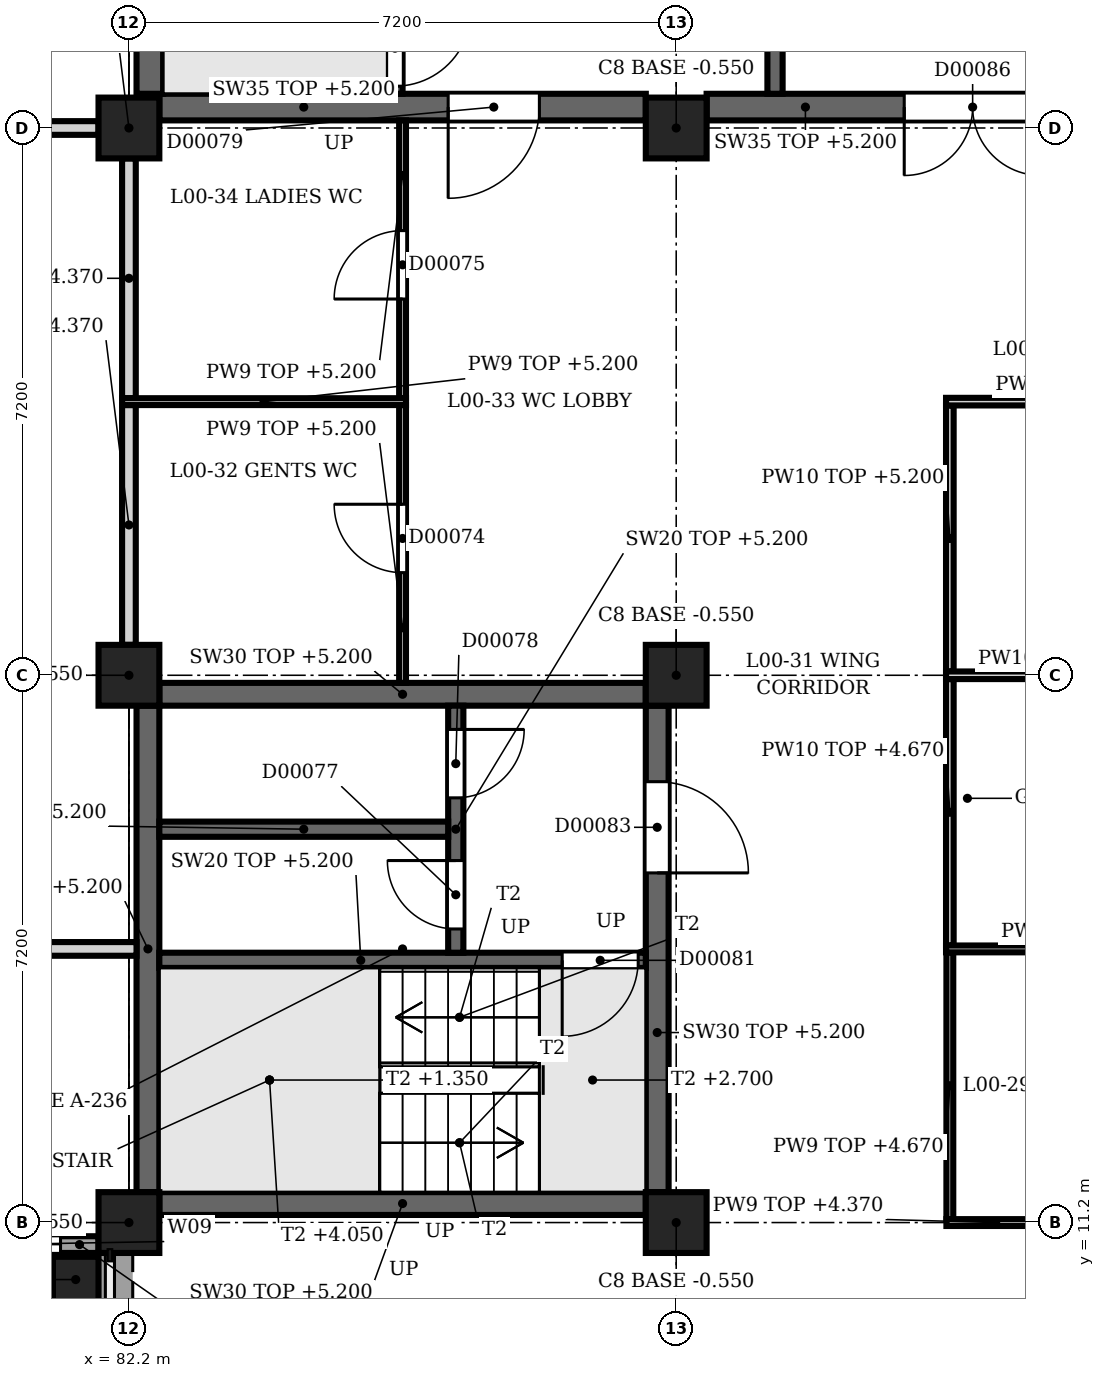
"""IFC4 building model, lengths in metres.
Left out: names, types, materials, properties, quantities, classifications, styles, units other than length and angle.
Written with IfcOpenShell. Run it as: python <this file> out.ifc"""

import sys

from ifc_helpers import new_model, si_unit, direction, frame, frame_2d, origin, origin_2d, place, context, subcontext, project, spatial, rectangle, extrude, element, fill, save


model = new_model("IFC4")
c1 = context("Model", 3, precision=1e-05, world=origin(), true_north=direction((0.0, 1.0)))
c2 = subcontext(c1, "Body", "Model", "MODEL_VIEW")
j1 = project(units=[si_unit("LENGTHUNIT", "METRE"), si_unit("PLANEANGLEUNIT", "RADIAN")], contexts=[c1])
p1 = place(None, origin())
s1 = spatial("IfcSite", under=j1, at=p1, CompositionType="ELEMENT")
p2 = place(p1, origin())
s2 = spatial("IfcBuilding", under=s1, at=p2, CompositionType="ELEMENT")
p3 = place(p2, origin())
s3 = spatial("IfcBuildingStorey", under=s2, at=p3, CompositionType="ELEMENT", Elevation=0.0)
for number, where, z_axis, x_axis in (
    (1, (82.2, 11.2, -0.55), (0.0, 0.0, 1.0), (1.0, 0.0, 0.0)),
    (2, (82.2, 18.4, -0.55), (0.0, 0.0, 1.0), (1.0, 0.0, 0.0)),
    (3, (82.2, 25.6, -0.55), (0.0, 0.0, 1.0), (1.0, 0.0, 0.0)),
    (4, (89.4, 11.2, -0.55), (0.0, 0.0, 1.0), (1.0, 0.0, 0.0)),
    (5, (89.4, 18.4, -0.55), (0.0, 0.0, 1.0), (1.0, 0.0, 0.0)),
    (6, (89.4, 25.6, -0.55), (0.0, 0.0, 1.0), (1.0, 0.0, 0.0)),
):
    element("IfcColumn", number, at=place(p3, frame(where, z_axis=z_axis, x_axis=x_axis)), inside=s3, PredefinedType="COLUMN", context=c2, shape_type="SweptSolid", body=[
        extrude(rectangle(XDim=0.8, YDim=0.8, at=origin_2d()), origin(), (0.0, 0.0, 1.0), 5.95),
    ])
p4 = place(p3, frame((81.5, 10.45, -0.55), z_axis=(0.0, 0.0, 1.0), x_axis=(1.0, 0.0, 0.0)))
e7 = element("IfcColumn", 7, at=p4, inside=s3, PredefinedType="COLUMN", context=c2, shape_type="SweptSolid", body=[
    extrude(rectangle(XDim=0.6, YDim=0.6, at=origin_2d()), origin(), (0.0, 0.0, 1.0), 5.95),
])
p5 = place(p3, frame((82.025, 8.0, 0.0), z_axis=(0.0, 0.0, 1.0), x_axis=(0.0, 1.0, 0.0)))
e8 = element("IfcWall", 8, at=p5, inside=s3, PredefinedType="SOLIDWALL", context=c2, shape_type="SweptSolid", body=[
    extrude(rectangle(XDim=2.8, YDim=0.45, at=frame_2d((1.4, 0.0))), origin(), (0.0, 0.0, 1.0), 0.9),
])
p6 = place(p3, frame((81.8, 10.91, 0.0), z_axis=(0.0, 0.0, 1.0), x_axis=(-1.0, 0.0, 0.0)))
e9 = element("IfcWall", 9, at=p6, inside=s3, PredefinedType="SOLIDWALL", context=c2, shape_type="SweptSolid", body=[
    extrude(rectangle(XDim=2.8, YDim=0.22, at=frame_2d((1.4, 0.0))), origin(), (0.0, 0.0, 1.0), 4.3),
])
p7 = place(p6, frame((0.5, 0.0, 0.9)))
e10 = element("IfcOpeningElement", 10, at=p7, cuts=e9, PredefinedType="OPENING", context=c2, shape_type="SweptSolid", body=[
    extrude(rectangle(XDim=1.8, YDim=2.1, at=frame_2d((0.9, 1.05))), frame((0.0, 0.12, 0.0), z_axis=(0.0, -1.0, 0.0), x_axis=(1.0, 0.0, 0.0)), (0.0, 0.0, 1.0), 0.24),
])
p8 = place(p3, frame((82.6, 25.875, 0.0), z_axis=(0.0, 0.0, 1.0), x_axis=(1.0, 0.0, 0.0)))
e11 = element("IfcWall", 11, at=p8, inside=s3, PredefinedType="SHEAR", context=c2, shape_type="SweptSolid", body=[
    extrude(rectangle(XDim=6.4, YDim=0.35, at=frame_2d((3.2, 0.0))), origin(), (0.0, 0.0, 1.0), 5.2),
])
p9 = place(p8, frame((3.8, 0.0, 0.0)))
e12 = element("IfcOpeningElement", 12, at=p9, cuts=e11, PredefinedType="OPENING", context=c2, shape_type="SweptSolid", body=[
    extrude(rectangle(XDim=1.2, YDim=2.1, at=frame_2d((0.6, 1.05))), frame((0.0, 0.185, 0.0), z_axis=(0.0, -1.0, 0.0), x_axis=(1.0, 0.0, 0.0)), (0.0, 0.0, 1.0), 0.37),
])
p10 = place(p3, frame((89.8, 25.875, 0.0), z_axis=(0.0, 0.0, 1.0), x_axis=(1.0, 0.0, 0.0)))
e13 = element("IfcWall", 13, at=p10, inside=s3, PredefinedType="SHEAR", context=c2, shape_type="SweptSolid", body=[
    extrude(rectangle(XDim=6.4, YDim=0.35, at=frame_2d((3.2, 0.0))), origin(), (0.0, 0.0, 1.0), 5.2),
])
p11 = place(p10, frame((2.6, 0.0, 0.0)))
e14 = element("IfcOpeningElement", 14, at=p11, cuts=e13, PredefinedType="OPENING", context=c2, shape_type="SweptSolid", body=[
    extrude(rectangle(XDim=1.8, YDim=2.1, at=frame_2d((0.9, 1.05))), frame((0.0, 0.185, 0.0), z_axis=(0.0, -1.0, 0.0), x_axis=(1.0, 0.0, 0.0)), (0.0, 0.0, 1.0), 0.37),
])
p12 = place(p3, frame((82.475, 26.05, 0.0), z_axis=(0.0, 0.0, 1.0), x_axis=(0.0, 1.0, 0.0)))
e15 = element("IfcWall", 15, at=p12, inside=s3, PredefinedType="SHEAR", context=c2, shape_type="SweptSolid", body=[
    extrude(rectangle(XDim=6.3, YDim=0.35, at=frame_2d((3.15, 0.0))), origin(), (0.0, 0.0, 1.0), 5.2),
])
p13 = place(p3, frame((85.7, 26.05, 0.0), z_axis=(0.0, 0.0, 1.0), x_axis=(0.0, 1.0, 0.0)))
e16 = element("IfcWall", 16, at=p13, inside=s3, PredefinedType="SHEAR", context=c2, shape_type="SweptSolid", body=[
    extrude(rectangle(XDim=6.3, YDim=0.2, at=frame_2d((3.15, 0.0))), origin(), (0.0, 0.0, 1.0), 5.2),
])
p14 = place(p13, frame((0.1, 0.0, 0.0)))
e17 = element("IfcOpeningElement", 17, at=p14, cuts=e16, PredefinedType="OPENING", context=c2, shape_type="SweptSolid", body=[
    extrude(rectangle(XDim=1.0, YDim=2.1, at=frame_2d((0.5, 1.05))), frame((0.0, 0.11, 0.0), z_axis=(0.0, -1.0, 0.0), x_axis=(1.0, 0.0, 0.0)), (0.0, 0.0, 1.0), 0.22),
])
p15 = place(p3, frame((90.7, 26.05, 0.0), z_axis=(0.0, 0.0, 1.0), x_axis=(0.0, 1.0, 0.0)))
e18 = element("IfcWall", 18, at=p15, inside=s3, PredefinedType="SHEAR", context=c2, shape_type="SweptSolid", body=[
    extrude(rectangle(XDim=3.05, YDim=0.2, at=frame_2d((1.525, 0.0))), origin(), (0.0, 0.0, 1.0), 5.2),
])
p16 = place(p3, frame((89.15, 11.6, 0.0), z_axis=(0.0, 0.0, 1.0), x_axis=(0.0, 1.0, 0.0)))
e19 = element("IfcWall", 19, at=p16, inside=s3, PredefinedType="SHEAR", context=c2, shape_type="SweptSolid", body=[
    extrude(rectangle(XDim=6.4, YDim=0.3, at=frame_2d((3.2, 0.0))), origin(), (0.0, 0.0, 1.0), 5.2),
])
p17 = place(p16, frame((4.2, 0.0, 0.0)))
e20 = element("IfcOpeningElement", 20, at=p17, cuts=e19, PredefinedType="OPENING", context=c2, shape_type="SweptSolid", body=[
    extrude(rectangle(XDim=1.2, YDim=2.1, at=frame_2d((0.6, 1.05))), frame((0.0, 0.16, 0.0), z_axis=(0.0, -1.0, 0.0), x_axis=(1.0, 0.0, 0.0)), (0.0, 0.0, 1.0), 0.32),
])
for number, where, z_axis, x_axis in (
    (21, (82.45, 11.6, 0.0), (0.0, 0.0, 1.0), (0.0, 1.0, 0.0)),
    (22, (82.6, 11.45, 0.0), (0.0, 0.0, 1.0), (1.0, 0.0, 0.0)),
    (23, (82.6, 18.15, 0.0), (0.0, 0.0, 1.0), (1.0, 0.0, 0.0)),
):
    element("IfcWall", number, at=place(p3, frame(where, z_axis=z_axis, x_axis=x_axis)), inside=s3, PredefinedType="SHEAR", context=c2, shape_type="SweptSolid", body=[
        extrude(rectangle(XDim=6.4, YDim=0.3, at=frame_2d((3.2, 0.0))), origin(), (0.0, 0.0, 1.0), 5.2),
    ])
p18 = place(p3, frame((82.6, 14.65, 0.0), z_axis=(0.0, 0.0, 1.0), x_axis=(1.0, 0.0, 0.0)))
e24 = element("IfcWall", 24, at=p18, inside=s3, PredefinedType="SHEAR", context=c2, shape_type="SweptSolid", body=[
    extrude(rectangle(XDim=6.4, YDim=0.2, at=frame_2d((3.2, 0.0))), origin(), (0.0, 0.0, 1.0), 5.2),
])
p19 = place(p18, frame((5.3, 0.0, 0.0)))
e25 = element("IfcOpeningElement", 25, at=p19, cuts=e24, PredefinedType="OPENING", context=c2, shape_type="SweptSolid", body=[
    extrude(rectangle(XDim=1.0, YDim=2.1, at=frame_2d((0.5, 1.05))), frame((0.0, 0.11, 0.0), z_axis=(0.0, -1.0, 0.0), x_axis=(1.0, 0.0, 0.0)), (0.0, 0.0, 1.0), 0.22),
])
p20 = place(p3, frame((86.5, 18.0, 0.0), z_axis=(0.0, 0.0, 1.0), x_axis=(0.0, -1.0, 0.0)))
e26 = element("IfcWall", 26, at=p20, inside=s3, PredefinedType="SHEAR", context=c2, shape_type="SweptSolid", body=[
    extrude(rectangle(XDim=3.25, YDim=0.2, at=frame_2d((1.625, 0.0))), origin(), (0.0, 0.0, 1.0), 5.2),
])
p21 = place(p20, frame((2.038, 0.0, 0.0)))
e27 = element("IfcOpeningElement", 27, at=p21, cuts=e26, PredefinedType="OPENING", context=c2, shape_type="SweptSolid", body=[
    extrude(rectangle(XDim=0.9, YDim=2.1, at=frame_2d((0.45, 1.05))), frame((0.0, 0.11, 0.0), z_axis=(0.0, -1.0, 0.0), x_axis=(1.0, 0.0, 0.0)), (0.0, 0.0, 1.0), 0.22),
])
p22 = place(p20, frame((0.312, 0.0, 0.0)))
e28 = element("IfcOpeningElement", 28, at=p22, cuts=e26, PredefinedType="OPENING", context=c2, shape_type="SweptSolid", body=[
    extrude(rectangle(XDim=0.9, YDim=2.1, at=frame_2d((0.45, 1.05))), frame((0.0, 0.11, 0.0), z_axis=(0.0, -1.0, 0.0), x_axis=(1.0, 0.0, 0.0)), (0.0, 0.0, 1.0), 0.22),
])
p23 = place(p3, frame((82.6, 16.375, 0.0), z_axis=(0.0, 0.0, 1.0), x_axis=(1.0, 0.0, 0.0)))
e29 = element("IfcWall", 29, at=p23, inside=s3, PredefinedType="SHEAR", context=c2, shape_type="SweptSolid", body=[
    extrude(rectangle(XDim=3.8, YDim=0.2, at=frame_2d((1.9, 0.0))), origin(), (0.0, 0.0, 1.0), 5.2),
])
p24 = place(p3, frame((92.955, 11.2, 0.0), z_axis=(0.0, 0.0, 1.0), x_axis=(1.0, 0.0, 0.0)))
e30 = element("IfcWall", 30, at=p24, inside=s3, PredefinedType="PARTITIONING", context=c2, shape_type="SweptSolid", body=[
    extrude(rectangle(XDim=3.245, YDim=0.09, at=frame_2d((1.623, 0.0))), origin(), (0.0, 0.0, 1.0), 4.37),
])
p25 = place(p24, frame((1.295, 0.0, 0.0)))
e31 = element("IfcOpeningElement", 31, at=p25, cuts=e30, PredefinedType="OPENING", context=c2, shape_type="SweptSolid", body=[
    extrude(rectangle(XDim=1.0, YDim=2.2, at=frame_2d((0.5, 1.1))), frame((0.0, 0.055, 0.0), z_axis=(0.0, -1.0, 0.0), x_axis=(1.0, 0.0, 0.0)), (0.0, 0.0, 1.0), 0.11),
])
p26 = place(p3, frame((82.3, 14.8, 0.0), z_axis=(0.0, 0.0, 1.0), x_axis=(-1.0, 0.0, 0.0)))
e32 = element("IfcWall", 32, at=p26, inside=s3, PredefinedType="PARTITIONING", context=c2, shape_type="SweptSolid", body=[
    extrude(rectangle(XDim=14.59, YDim=0.18, at=frame_2d((7.295, 0.0))), origin(), (0.0, 0.0, 1.0), 5.2),
])
p27 = place(p26, frame((6.45, 0.0, 0.0)))
e33 = element("IfcOpeningElement", 33, at=p27, cuts=e32, PredefinedType="OPENING", context=c2, shape_type="SweptSolid", body=[
    extrude(rectangle(XDim=1.8, YDim=2.1, at=frame_2d((0.9, 1.05))), frame((0.0, 0.1, 0.0), z_axis=(0.0, -1.0, 0.0), x_axis=(1.0, 0.0, 0.0)), (0.0, 0.0, 1.0), 0.2),
])
p28 = place(p3, frame((92.95, 14.8, 0.0), z_axis=(0.0, 0.0, 1.0), x_axis=(1.0, 0.0, 0.0)))
e34 = element("IfcWall", 34, at=p28, inside=s3, PredefinedType="PARTITIONING", context=c2, shape_type="SweptSolid", body=[
    extrude(rectangle(XDim=3.695, YDim=0.09, at=frame_2d((1.848, 0.0))), origin(), (0.0, 0.0, 1.0), 5.2),
])
p29 = place(p3, frame((92.95, 18.4, 0.0), z_axis=(0.0, 0.0, 1.0), x_axis=(1.0, 0.0, 0.0)))
e35 = element("IfcWall", 35, at=p29, inside=s3, PredefinedType="PARTITIONING", context=c2, shape_type="SweptSolid", body=[
    extrude(rectangle(XDim=3.25, YDim=0.1, at=frame_2d((1.625, 0.0))), origin(), (0.0, 0.0, 1.0), 4.37),
])
p30 = place(p3, frame((82.11, 22.0, 0.0), z_axis=(0.0, 0.0, 1.0), x_axis=(1.0, 0.0, 0.0)))
e36 = element("IfcWall", 36, at=p30, inside=s3, PredefinedType="PARTITIONING", context=c2, shape_type="SweptSolid", body=[
    extrude(rectangle(XDim=3.735, YDim=0.09, at=frame_2d((1.867, 0.0))), origin(), (0.0, 0.0, 1.0), 5.2),
])
p31 = place(p3, frame((92.95, 22.0, 0.0), z_axis=(0.0, 0.0, 1.0), x_axis=(1.0, 0.0, 0.0)))
e37 = element("IfcWall", 37, at=p31, inside=s3, PredefinedType="PARTITIONING", context=c2, shape_type="SweptSolid", body=[
    extrude(rectangle(XDim=3.7, YDim=0.1, at=frame_2d((1.85, 0.0))), origin(), (0.0, 0.0, 1.0), 5.2),
])
p32 = place(p3, frame((75.25, 25.6, 0.0), z_axis=(0.0, 0.0, 1.0), x_axis=(1.0, 0.0, 0.0)))
e38 = element("IfcWall", 38, at=p32, inside=s3, PredefinedType="PARTITIONING", context=c2, shape_type="SweptSolid", body=[
    extrude(rectangle(XDim=6.55, YDim=0.18, at=frame_2d((3.275, 0.0))), origin(), (0.0, 0.0, 1.0), 4.47),
])
for number, where, z_axis, x_axis in (
    (39, (82.2, 18.8, 0.0), (0.0, 0.0, 1.0), (0.0, 1.0, 0.0)),
    (40, (82.2, 22.045, 0.0), (0.0, 0.0, 1.0), (0.0, 1.0, 0.0)),
):
    element("IfcWall", number, at=place(p3, frame(where, z_axis=z_axis, x_axis=x_axis)), inside=s3, PredefinedType="PARTITIONING", context=c2, shape_type="SweptSolid", body=[
        extrude(rectangle(XDim=3.155, YDim=0.18, at=frame_2d((1.578, 0.0))), origin(), (0.0, 0.0, 1.0), 4.37),
    ])
p33 = place(p3, frame((85.8, 18.3, 0.0), z_axis=(0.0, 0.0, 1.0), x_axis=(0.0, 1.0, 0.0)))
e41 = element("IfcWall", 41, at=p33, inside=s3, PredefinedType="PARTITIONING", context=c2, shape_type="SweptSolid", body=[
    extrude(rectangle(XDim=3.655, YDim=0.09, at=frame_2d((1.828, 0.0))), origin(), (0.0, 0.0, 1.0), 5.2),
])
p34 = place(p33, frame((1.45, 0.0, 0.0)))
e42 = element("IfcOpeningElement", 42, at=p34, cuts=e41, PredefinedType="OPENING", context=c2, shape_type="SweptSolid", body=[
    extrude(rectangle(XDim=0.9, YDim=2.1, at=frame_2d((0.45, 1.05))), frame((0.0, 0.055, 0.0), z_axis=(0.0, -1.0, 0.0), x_axis=(1.0, 0.0, 0.0)), (0.0, 0.0, 1.0), 0.11),
])
p35 = place(p3, frame((85.8, 22.045, 0.0), z_axis=(0.0, 0.0, 1.0), x_axis=(0.0, 1.0, 0.0)))
e43 = element("IfcWall", 43, at=p35, inside=s3, PredefinedType="PARTITIONING", context=c2, shape_type="SweptSolid", body=[
    extrude(rectangle(XDim=3.655, YDim=0.09, at=frame_2d((1.828, 0.0))), origin(), (0.0, 0.0, 1.0), 5.2),
])
p36 = place(p35, frame((1.305, 0.0, 0.0)))
e44 = element("IfcOpeningElement", 44, at=p36, cuts=e43, PredefinedType="OPENING", context=c2, shape_type="SweptSolid", body=[
    extrude(rectangle(XDim=0.9, YDim=2.1, at=frame_2d((0.45, 1.05))), frame((0.0, 0.055, 0.0), z_axis=(0.0, -1.0, 0.0), x_axis=(1.0, 0.0, 0.0)), (0.0, 0.0, 1.0), 0.11),
])
p37 = place(p3, frame((93.0, 11.245, 0.0), z_axis=(0.0, 0.0, 1.0), x_axis=(0.0, 1.0, 0.0)))
e45 = element("IfcWall", 45, at=p37, inside=s3, PredefinedType="PARTITIONING", context=c2, shape_type="SweptSolid", body=[
    extrude(rectangle(XDim=3.51, YDim=0.09, at=frame_2d((1.755, 0.0))), origin(), (0.0, 0.0, 1.0), 4.67),
])
p38 = place(p3, frame((93.0, 14.845, 0.0), z_axis=(0.0, 0.0, 1.0), x_axis=(0.0, 1.0, 0.0)))
e46 = element("IfcWall", 46, at=p38, inside=s3, PredefinedType="PARTITIONING", context=c2, shape_type="SweptSolid", body=[
    extrude(rectangle(XDim=3.505, YDim=0.1, at=frame_2d((1.752, 0.0))), origin(), (0.0, 0.0, 1.0), 4.67),
])
p39 = place(p3, frame((93.0, 18.45, 0.0), z_axis=(0.0, 0.0, 1.0), x_axis=(0.0, 1.0, 0.0)))
e47 = element("IfcWall", 47, at=p39, inside=s3, PredefinedType="PARTITIONING", context=c2, shape_type="SweptSolid", body=[
    extrude(rectangle(XDim=3.5, YDim=0.1, at=frame_2d((1.75, 0.0))), origin(), (0.0, 0.0, 1.0), 5.2),
])
p40 = place(p7, origin())
e48 = element("IfcWindow", 48, at=p40, inside=s3, PartitioningType="SINGLE_PANEL", PredefinedType="WINDOW", context=c2, shape_type="SweptSolid", body=[
    extrude(rectangle(XDim=1.8, YDim=2.1, at=frame_2d((0.9, 1.05))), frame((0.0, 0.03, 0.0), z_axis=(0.0, -1.0, 0.0), x_axis=(1.0, 0.0, 0.0)), (0.0, 0.0, 1.0), 0.06),
])
fill(e10, e48)
p41 = place(p9, origin())
e49 = element("IfcDoor", 49, at=p41, inside=s3, OperationType="SINGLE_SWING_RIGHT", PredefinedType="DOOR", context=c2, shape_type="SweptSolid", body=[
    extrude(rectangle(XDim=1.2, YDim=2.1, at=frame_2d((0.6, 1.05))), frame((0.0, 0.025, 0.0), z_axis=(0.0, -1.0, 0.0), x_axis=(1.0, 0.0, 0.0)), (0.0, 0.0, 1.0), 0.05),
])
fill(e12, e49)
p42 = place(p11, origin())
e50 = element("IfcDoor", 50, at=p42, inside=s3, OperationType="SINGLE_SWING_LEFT", PredefinedType="DOOR", context=c2, shape_type="SweptSolid", body=[
    extrude(rectangle(XDim=1.8, YDim=2.1, at=frame_2d((0.9, 1.05))), frame((0.0, 0.025, 0.0), z_axis=(0.0, -1.0, 0.0), x_axis=(1.0, 0.0, 0.0)), (0.0, 0.0, 1.0), 0.05),
])
fill(e14, e50)
p43 = place(p14, origin())
e51 = element("IfcDoor", 51, at=p43, inside=s3, OperationType="SINGLE_SWING_LEFT", PredefinedType="DOOR", context=c2, shape_type="SweptSolid", body=[
    extrude(rectangle(XDim=1.0, YDim=2.1, at=frame_2d((0.5, 1.05))), frame((0.0, 0.025, 0.0), z_axis=(0.0, -1.0, 0.0), x_axis=(1.0, 0.0, 0.0)), (0.0, 0.0, 1.0), 0.05),
])
fill(e17, e51)
p44 = place(p17, origin())
e52 = element("IfcDoor", 52, at=p44, inside=s3, OperationType="SINGLE_SWING_RIGHT", PredefinedType="DOOR", context=c2, shape_type="SweptSolid", body=[
    extrude(rectangle(XDim=1.2, YDim=2.1, at=frame_2d((0.6, 1.05))), frame((0.0, 0.025, 0.0), z_axis=(0.0, -1.0, 0.0), x_axis=(1.0, 0.0, 0.0)), (0.0, 0.0, 1.0), 0.05),
])
fill(e20, e52)
p45 = place(p21, origin())
e53 = element("IfcDoor", 53, at=p45, inside=s3, OperationType="SINGLE_SWING_RIGHT", PredefinedType="DOOR", context=c2, shape_type="SweptSolid", body=[
    extrude(rectangle(XDim=0.9, YDim=2.1, at=frame_2d((0.45, 1.05))), frame((0.0, 0.025, 0.0), z_axis=(0.0, -1.0, 0.0), x_axis=(1.0, 0.0, 0.0)), (0.0, 0.0, 1.0), 0.05),
])
fill(e27, e53)
p46 = place(p22, origin())
e54 = element("IfcDoor", 54, at=p46, inside=s3, OperationType="SINGLE_SWING_LEFT", PredefinedType="DOOR", context=c2, shape_type="SweptSolid", body=[
    extrude(rectangle(XDim=0.9, YDim=2.1, at=frame_2d((0.45, 1.05))), frame((0.0, 0.025, 0.0), z_axis=(0.0, -1.0, 0.0), x_axis=(1.0, 0.0, 0.0)), (0.0, 0.0, 1.0), 0.05),
])
fill(e28, e54)
p47 = place(p19, origin())
e55 = element("IfcDoor", 55, at=p47, inside=s3, OperationType="SINGLE_SWING_RIGHT", PredefinedType="DOOR", context=c2, shape_type="SweptSolid", body=[
    extrude(rectangle(XDim=1.0, YDim=2.1, at=frame_2d((0.5, 1.05))), frame((0.0, 0.025, 0.0), z_axis=(0.0, -1.0, 0.0), x_axis=(1.0, 0.0, 0.0)), (0.0, 0.0, 1.0), 0.05),
])
fill(e25, e55)
p48 = place(p34, origin())
e56 = element("IfcDoor", 56, at=p48, inside=s3, OperationType="SINGLE_SWING_RIGHT", PredefinedType="DOOR", context=c2, shape_type="SweptSolid", body=[
    extrude(rectangle(XDim=0.9, YDim=2.1, at=frame_2d((0.45, 1.05))), frame((0.0, 0.025, 0.0), z_axis=(0.0, -1.0, 0.0), x_axis=(1.0, 0.0, 0.0)), (0.0, 0.0, 1.0), 0.05),
])
fill(e42, e56)
p49 = place(p36, origin())
e57 = element("IfcDoor", 57, at=p49, inside=s3, OperationType="SINGLE_SWING_LEFT", PredefinedType="DOOR", context=c2, shape_type="SweptSolid", body=[
    extrude(rectangle(XDim=0.9, YDim=2.1, at=frame_2d((0.45, 1.05))), frame((0.0, 0.025, 0.0), z_axis=(0.0, -1.0, 0.0), x_axis=(1.0, 0.0, 0.0)), (0.0, 0.0, 1.0), 0.05),
])
fill(e44, e57)
save(model, sys.argv[1])
